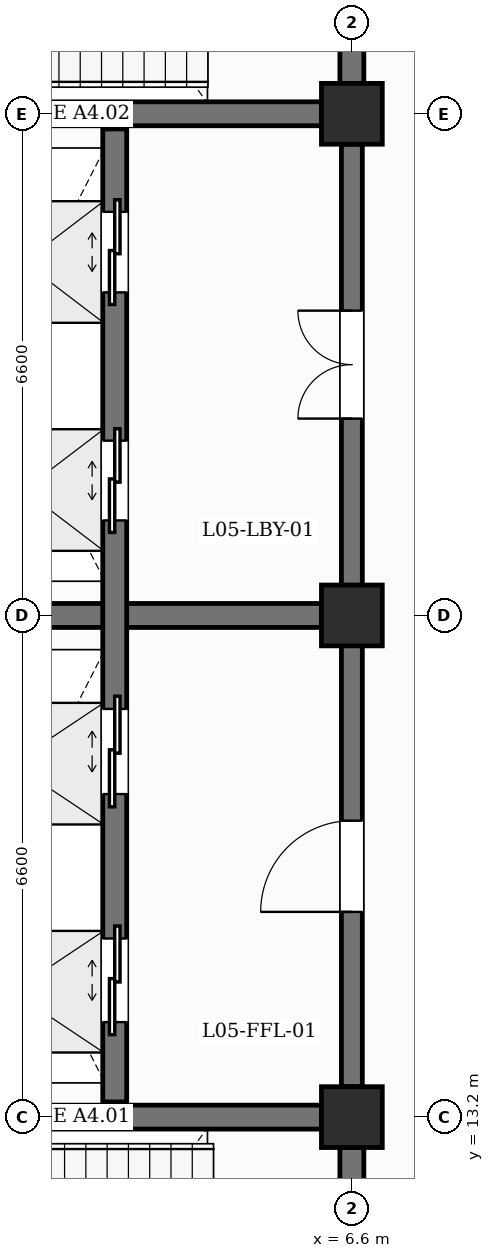
"""IFC4 building model, lengths in metres.
Left out: names, types, materials, properties, quantities, classifications, styles, units other than length and angle.
Written with IfcOpenShell. Run it as: python <this file> out.ifc"""

import sys

from ifc_helpers import new_model, si_unit, direction, frame, frame_2d, origin, origin_2d, place, context, subcontext, project, spatial, rectangle, extrude, element, fill, save


model = new_model("IFC4")
c1 = context("Model", 3, precision=1e-05, world=origin(), true_north=direction((0.0, 1.0)))
c2 = subcontext(c1, "Body", "Model", "MODEL_VIEW")
j1 = project(units=[si_unit("LENGTHUNIT", "METRE"), si_unit("PLANEANGLEUNIT", "RADIAN")], contexts=[c1])
p1 = place(None, origin())
s1 = spatial("IfcSite", under=j1, at=p1, CompositionType="ELEMENT")
p2 = place(p1, origin())
s2 = spatial("IfcBuilding", under=s1, at=p2, CompositionType="ELEMENT")
p3 = place(p2, frame((0.0, 0.0, 22.8)))
s3 = spatial("IfcBuildingStorey", under=s2, at=p3, CompositionType="ELEMENT", Elevation=22.8)
for number, where, z_axis, x_axis in (
    (1, (6.6, 13.2, 0.0), (0.0, 0.0, 1.0), (1.0, 0.0, 0.0)),
    (2, (6.6, 19.8, 0.0), (0.0, 0.0, 1.0), (1.0, 0.0, 0.0)),
    (3, (6.6, 26.4, 0.0), (0.0, 0.0, 1.0), (1.0, 0.0, 0.0)),
):
    element("IfcColumn", number, at=place(p3, frame(where, z_axis=z_axis, x_axis=x_axis)), inside=s3, PredefinedType="COLUMN", context=c2, shape_type="SweptSolid", body=[
        extrude(rectangle(XDim=0.8, YDim=0.8, at=origin_2d()), origin(), (0.0, 0.0, 1.0), 4.2),
    ])
p4 = place(p3, frame((0.4, 13.2, 0.0), z_axis=(0.0, 0.0, 1.0), x_axis=(1.0, 0.0, 0.0)))
e4 = element("IfcWall", 4, at=p4, inside=s3, PredefinedType="SHEAR", context=c2, shape_type="SweptSolid", body=[
    extrude(rectangle(XDim=5.8, YDim=0.315, at=frame_2d((2.9, 0.0))), origin(), (0.0, 0.0, 1.0), 3.17),
])
p5 = place(p3, frame((6.6, 7.0, 0.0), z_axis=(0.0, 0.0, 1.0), x_axis=(0.0, 1.0, 0.0)))
e5 = element("IfcWall", 5, at=p5, inside=s3, PredefinedType="SHEAR", context=c2, shape_type="SweptSolid", body=[
    extrude(rectangle(XDim=5.8, YDim=0.315, at=frame_2d((2.9, 0.0))), origin(), (0.0, 0.0, 1.0), 3.17),
])
p6 = place(p5, frame((2.35, 0.0, 0.0)))
e6 = element("IfcOpeningElement", 6, at=p6, cuts=e5, PredefinedType="OPENING", context=c2, shape_type="SweptSolid", body=[
    extrude(rectangle(XDim=1.1, YDim=2.15, at=frame_2d((0.55, 1.075))), frame((0.0, 0.167, 0.0), z_axis=(0.0, -1.0, 0.0), x_axis=(1.0, 0.0, 0.0)), (0.0, 0.0, 1.0), 0.335),
])
p7 = place(p3, frame((0.4, 26.4, 0.0), z_axis=(0.0, 0.0, 1.0), x_axis=(1.0, 0.0, 0.0)))
e7 = element("IfcWall", 7, at=p7, inside=s3, PredefinedType="SHEAR", context=c2, shape_type="SweptSolid", body=[
    extrude(rectangle(XDim=5.8, YDim=0.315, at=frame_2d((2.9, 0.0))), origin(), (0.0, 0.0, 1.0), 3.17),
])
p8 = place(p3, frame((6.6, 26.8, 0.0), z_axis=(0.0, 0.0, 1.0), x_axis=(0.0, 1.0, 0.0)))
e8 = element("IfcWall", 8, at=p8, inside=s3, PredefinedType="SHEAR", context=c2, shape_type="SweptSolid", body=[
    extrude(rectangle(XDim=5.8, YDim=0.315, at=frame_2d((2.9, 0.0))), origin(), (0.0, 0.0, 1.0), 3.17),
])
p9 = place(p8, frame((2.35, 0.0, 0.0)))
e9 = element("IfcOpeningElement", 9, at=p9, cuts=e8, PredefinedType="OPENING", context=c2, shape_type="SweptSolid", body=[
    extrude(rectangle(XDim=1.1, YDim=2.15, at=frame_2d((0.55, 1.075))), frame((0.0, 0.167, 0.0), z_axis=(0.0, -1.0, 0.0), x_axis=(1.0, 0.0, 0.0)), (0.0, 0.0, 1.0), 0.335),
])
p10 = place(p3, frame((0.4, 19.8, 0.0), z_axis=(0.0, 0.0, 1.0), x_axis=(1.0, 0.0, 0.0)))
e10 = element("IfcWall", 10, at=p10, inside=s3, PredefinedType="SHEAR", context=c2, shape_type="SweptSolid", body=[
    extrude(rectangle(XDim=5.8, YDim=0.315, at=frame_2d((2.9, 0.0))), origin(), (0.0, 0.0, 1.0), 3.17),
])
p11 = place(p3, frame((6.6, 13.6, 0.0), z_axis=(0.0, 0.0, 1.0), x_axis=(0.0, 1.0, 0.0)))
e11 = element("IfcWall", 11, at=p11, inside=s3, PredefinedType="SHEAR", context=c2, shape_type="SweptSolid", body=[
    extrude(rectangle(XDim=5.8, YDim=0.275, at=frame_2d((2.9, 0.0))), origin(), (0.0, 0.0, 1.0), 3.17),
])
p12 = place(p11, frame((2.3, 0.0, 0.0)))
e12 = element("IfcOpeningElement", 12, at=p12, cuts=e11, PredefinedType="OPENING", context=c2, shape_type="SweptSolid", body=[
    extrude(rectangle(XDim=1.2, YDim=2.25, at=frame_2d((0.6, 1.125))), frame((0.0, 0.147, 0.0), z_axis=(0.0, -1.0, 0.0), x_axis=(1.0, 0.0, 0.0)), (0.0, 0.0, 1.0), 0.295),
])
p13 = place(p3, frame((6.6, 20.2, 0.0), z_axis=(0.0, 0.0, 1.0), x_axis=(0.0, 1.0, 0.0)))
e13 = element("IfcWall", 13, at=p13, inside=s3, PredefinedType="SHEAR", context=c2, shape_type="SweptSolid", body=[
    extrude(rectangle(XDim=5.8, YDim=0.275, at=frame_2d((2.9, 0.0))), origin(), (0.0, 0.0, 1.0), 3.17),
])
p14 = place(p13, frame((2.19, 0.0, 0.0)))
e14 = element("IfcOpeningElement", 14, at=p14, cuts=e13, PredefinedType="OPENING", context=c2, shape_type="SweptSolid", body=[
    extrude(rectangle(XDim=1.42, YDim=2.2, at=frame_2d((0.71, 1.1))), frame((0.0, 0.147, 0.0), z_axis=(0.0, -1.0, 0.0), x_axis=(1.0, 0.0, 0.0)), (0.0, 0.0, 1.0), 0.295),
])
p15 = place(p3, frame((3.48, 13.4, 0.0), z_axis=(0.0, 0.0, 1.0), x_axis=(0.0, 1.0, 0.0)))
e15 = element("IfcWall", 15, at=p15, inside=s3, PredefinedType="SHEAR", context=c2, shape_type="SweptSolid", body=[
    extrude(rectangle(XDim=6.2, YDim=0.315, at=frame_2d((3.1, 0.0))), origin(), (0.0, 0.0, 1.0), 3.87),
])
p16 = place(p15, frame((1.05, 0.0, 0.0)))
e16 = element("IfcOpeningElement", 16, at=p16, cuts=e15, PredefinedType="OPENING", context=c2, shape_type="SweptSolid", body=[
    extrude(rectangle(XDim=1.1, YDim=2.15, at=frame_2d((0.55, 1.075))), frame((0.0, 0.167, 0.0), z_axis=(0.0, -1.0, 0.0), x_axis=(1.0, 0.0, 0.0)), (0.0, 0.0, 1.0), 0.335),
])
p17 = place(p15, frame((4.05, 0.0, 0.0)))
e17 = element("IfcOpeningElement", 17, at=p17, cuts=e15, PredefinedType="OPENING", context=c2, shape_type="SweptSolid", body=[
    extrude(rectangle(XDim=1.12, YDim=2.15, at=frame_2d((0.56, 1.075))), frame((0.0, 0.167, 0.0), z_axis=(0.0, -1.0, 0.0), x_axis=(1.0, 0.0, 0.0)), (0.0, 0.0, 1.0), 0.335),
])
p18 = place(p3, frame((3.48, 20.0, 0.0), z_axis=(0.0, 0.0, 1.0), x_axis=(0.0, 1.0, 0.0)))
e18 = element("IfcWall", 18, at=p18, inside=s3, PredefinedType="SHEAR", context=c2, shape_type="SweptSolid", body=[
    extrude(rectangle(XDim=6.2, YDim=0.315, at=frame_2d((3.1, 0.0))), origin(), (0.0, 0.0, 1.0), 3.87),
])
p19 = place(p18, frame((1.05, 0.0, 0.0)))
e19 = element("IfcOpeningElement", 19, at=p19, cuts=e18, PredefinedType="OPENING", context=c2, shape_type="SweptSolid", body=[
    extrude(rectangle(XDim=1.05, YDim=2.15, at=frame_2d((0.525, 1.075))), frame((0.0, 0.167, 0.0), z_axis=(0.0, -1.0, 0.0), x_axis=(1.0, 0.0, 0.0)), (0.0, 0.0, 1.0), 0.335),
])
p20 = place(p18, frame((4.05, 0.0, 0.0)))
e20 = element("IfcOpeningElement", 20, at=p20, cuts=e18, PredefinedType="OPENING", context=c2, shape_type="SweptSolid", body=[
    extrude(rectangle(XDim=1.06, YDim=2.15, at=frame_2d((0.53, 1.075))), frame((0.0, 0.167, 0.0), z_axis=(0.0, -1.0, 0.0), x_axis=(1.0, 0.0, 0.0)), (0.0, 0.0, 1.0), 0.335),
])
p21 = place(p16, origin())
e21 = element("IfcDoor", 21, at=p21, inside=s3, OperationType="DOUBLE_DOOR_SLIDING", PredefinedType="USERDEFINED", context=c2, shape_type="SweptSolid", body=[
    extrude(rectangle(XDim=1.1, YDim=2.15, at=frame_2d((0.55, 1.075))), frame((0.0, 0.025, 0.0), z_axis=(0.0, -1.0, 0.0), x_axis=(1.0, 0.0, 0.0)), (0.0, 0.0, 1.0), 0.05),
])
fill(e16, e21)
p22 = place(p17, origin())
e22 = element("IfcDoor", 22, at=p22, inside=s3, OperationType="DOUBLE_DOOR_SLIDING", PredefinedType="USERDEFINED", context=c2, shape_type="SweptSolid", body=[
    extrude(rectangle(XDim=1.12, YDim=2.15, at=frame_2d((0.56, 1.075))), frame((0.0, 0.025, 0.0), z_axis=(0.0, -1.0, 0.0), x_axis=(1.0, 0.0, 0.0)), (0.0, 0.0, 1.0), 0.05),
])
fill(e17, e22)
p23 = place(p19, origin())
e23 = element("IfcDoor", 23, at=p23, inside=s3, OperationType="DOUBLE_DOOR_SLIDING", PredefinedType="USERDEFINED", context=c2, shape_type="SweptSolid", body=[
    extrude(rectangle(XDim=1.05, YDim=2.15, at=frame_2d((0.525, 1.075))), frame((0.0, 0.025, 0.0), z_axis=(0.0, -1.0, 0.0), x_axis=(1.0, 0.0, 0.0)), (0.0, 0.0, 1.0), 0.05),
])
fill(e19, e23)
p24 = place(p20, origin())
e24 = element("IfcDoor", 24, at=p24, inside=s3, OperationType="DOUBLE_DOOR_SLIDING", PredefinedType="USERDEFINED", context=c2, shape_type="SweptSolid", body=[
    extrude(rectangle(XDim=1.06, YDim=2.15, at=frame_2d((0.53, 1.075))), frame((0.0, 0.025, 0.0), z_axis=(0.0, -1.0, 0.0), x_axis=(1.0, 0.0, 0.0)), (0.0, 0.0, 1.0), 0.05),
])
fill(e20, e24)
p25 = place(p12, origin())
e25 = element("IfcDoor", 25, at=p25, inside=s3, OperationType="SINGLE_SWING_LEFT", PredefinedType="DOOR", context=c2, shape_type="SweptSolid", body=[
    extrude(rectangle(XDim=1.2, YDim=2.25, at=frame_2d((0.6, 1.125))), frame((0.0, 0.025, 0.0), z_axis=(0.0, -1.0, 0.0), x_axis=(1.0, 0.0, 0.0)), (0.0, 0.0, 1.0), 0.05),
])
fill(e12, e25)
p26 = place(p14, origin())
e26 = element("IfcDoor", 26, at=p26, inside=s3, OperationType="DOUBLE_DOOR_SINGLE_SWING", PredefinedType="DOOR", context=c2, shape_type="SweptSolid", body=[
    extrude(rectangle(XDim=1.42, YDim=2.2, at=frame_2d((0.71, 1.1))), frame((0.0, 0.025, 0.0), z_axis=(0.0, -1.0, 0.0), x_axis=(1.0, 0.0, 0.0)), (0.0, 0.0, 1.0), 0.05),
])
fill(e14, e26)
save(model, sys.argv[1])
